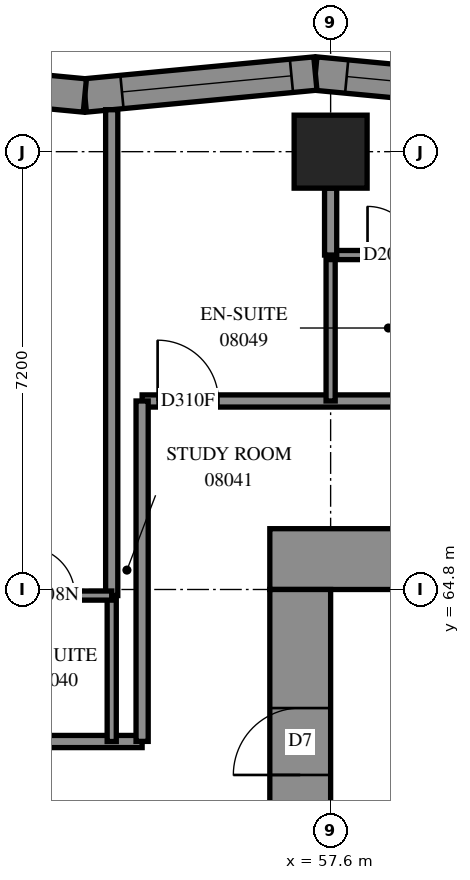
"""IFC4 building model, lengths in metres.
Left out: names, types, materials, properties, quantities, classifications, styles, units other than length and angle.
Written with IfcOpenShell. Run it as: python <this file> out.ifc"""

import sys

from ifc_helpers import new_model, si_unit, direction, frame, frame_2d, origin, origin_2d, place, context, subcontext, project, spatial, polyline, rectangle, outline, extrude, element, fill, save


model = new_model("IFC4")
c1 = context("Model", 3, precision=1e-05, world=origin(), true_north=direction((0.0, 1.0)))
c2 = subcontext(c1, "Body", "Model", "MODEL_VIEW")
j1 = project(units=[si_unit("LENGTHUNIT", "METRE"), si_unit("PLANEANGLEUNIT", "RADIAN")], contexts=[c1])
p1 = place(None, origin())
s1 = spatial("IfcSite", under=j1, at=p1, CompositionType="ELEMENT")
p2 = place(p1, origin())
s2 = spatial("IfcBuilding", under=s1, at=p2, CompositionType="ELEMENT")
p3 = place(p2, frame((0.0, 0.0, 33.8)))
s3 = spatial("IfcBuildingStorey", under=s2, at=p3, CompositionType="ELEMENT", Elevation=33.8)
p4 = place(p3, frame((57.6, 72.0, 0.0), z_axis=(0.0, 0.0, 1.0), x_axis=(1.0, 0.0, 0.0)))
e1 = element("IfcColumn", 1, at=p4, inside=s3, PredefinedType="COLUMN", context=c2, shape_type="SweptSolid", body=[
    extrude(rectangle(XDim=1.2, YDim=1.2, at=origin_2d()), origin(), (0.0, 0.0, 1.0), 3.1),
])
p5 = place(p3, frame((56.6, 65.3, -0.3), z_axis=(0.0, 0.0, 1.0), x_axis=(1.0, 0.0, 0.0)))
e2 = element("IfcWall", 2, at=p5, inside=s3, PredefinedType="SHEAR", context=c2, shape_type="SweptSolid", body=[
    extrude(rectangle(XDim=16.4, YDim=1.0, at=frame_2d((8.2, 0.0))), origin(), (0.0, 0.0, 1.0), 2.7),
])
p6 = place(p5, frame((11.0, 0.0, 0.3)))
e3 = element("IfcOpeningElement", 3, at=p6, cuts=e2, PredefinedType="OPENING", context=c2, shape_type="SweptSolid", body=[
    extrude(rectangle(XDim=0.8, YDim=2.1, at=frame_2d((0.4, 1.05))), frame((0.0, 0.51, 0.0), z_axis=(0.0, -1.0, 0.0), x_axis=(1.0, 0.0, 0.0)), (0.0, 0.0, 1.0), 1.02),
])
p7 = place(p3, frame((57.1, 50.4, -0.3), z_axis=(0.0, 0.0, 1.0), x_axis=(0.0, 1.0, 0.0)))
e4 = element("IfcWall", 4, at=p7, inside=s3, PredefinedType="SHEAR", context=c2, shape_type="SweptSolid", body=[
    extrude(rectangle(XDim=14.4, YDim=1.0, at=frame_2d((7.2, 0.0))), origin(), (0.0, 0.0, 1.0), 2.7),
])
p8 = place(p7, frame((4.55, 0.0, 0.3)))
e5 = element("IfcOpeningElement", 5, at=p8, cuts=e4, PredefinedType="OPENING", context=c2, shape_type="SweptSolid", body=[
    extrude(rectangle(XDim=1.1, YDim=2.1, at=frame_2d((0.55, 1.05))), frame((0.0, 0.51, 0.0), z_axis=(0.0, -1.0, 0.0), x_axis=(1.0, 0.0, 0.0)), (0.0, 0.0, 1.0), 1.02),
])
p9 = place(p7, frame((11.35, 0.0, 0.3)))
e6 = element("IfcOpeningElement", 6, at=p9, cuts=e4, PredefinedType="OPENING", context=c2, shape_type="SweptSolid", body=[
    extrude(rectangle(XDim=1.1, YDim=2.1, at=frame_2d((0.55, 1.05))), frame((0.0, 0.51, 0.0), z_axis=(0.0, -1.0, 0.0), x_axis=(1.0, 0.0, 0.0)), (0.0, 0.0, 1.0), 1.02),
])
p10 = place(p3, frame((61.14, 72.924, 0.0), z_axis=(0.0, 0.0, 1.0), x_axis=(-0.9954966527, 0.0947967005, 0.0)))
e7 = element("IfcWall", 7, at=p10, inside=s3, PredefinedType="SOLIDWALL", context=c2, shape_type="SweptSolid", body=[
    extrude(outline(polyline([(0.026, -0.275), (3.834, -0.275), (3.782, 0.275), (-0.026, 0.275), (0.026, -0.275)])), origin(), (0.0, 0.0, 1.0), 3.1),
])
p11 = place(p10, frame((0.491, 0.0, 0.5)))
e8 = element("IfcOpeningElement", 8, at=p11, cuts=e7, PredefinedType="OPENING", context=c2, shape_type="SweptSolid", body=[
    extrude(rectangle(XDim=2.8, YDim=2.45, at=frame_2d((1.4, 1.225))), frame((0.0, 0.285, 0.0), z_axis=(0.0, -1.0, 0.0), x_axis=(1.0, 0.0, 0.0)), (0.0, 0.0, 1.0), 0.57),
])
p12 = place(p3, frame((57.349, 73.285, 0.0), z_axis=(0.0, 0.0, 1.0), x_axis=(-0.9954966527, -0.0947967005, 0.0)))
e9 = element("IfcWall", 9, at=p12, inside=s3, PredefinedType="SOLIDWALL", context=c2, shape_type="SweptSolid", body=[
    extrude(outline(polyline([(-0.026, -0.275), (3.782, -0.275), (3.834, 0.275), (0.026, 0.275), (-0.026, -0.275)])), origin(), (0.0, 0.0, 1.0), 3.1),
])
p13 = place(p12, frame((0.395, 0.0, 0.5)))
e10 = element("IfcOpeningElement", 10, at=p13, cuts=e9, PredefinedType="OPENING", context=c2, shape_type="SweptSolid", body=[
    extrude(rectangle(XDim=2.8, YDim=2.45, at=frame_2d((1.4, 1.225))), frame((0.0, 0.285, 0.0), z_axis=(0.0, -1.0, 0.0), x_axis=(1.0, 0.0, 0.0)), (0.0, 0.0, 1.0), 0.57),
])
p14 = place(p3, frame((53.558, 72.924, 0.0), z_axis=(0.0, 0.0, 1.0), x_axis=(-0.9954966527, 0.0947967005, 0.0)))
e11 = element("IfcWall", 11, at=p14, inside=s3, PredefinedType="SOLIDWALL", context=c2, shape_type="SweptSolid", body=[
    extrude(outline(polyline([(0.026, -0.275), (3.834, -0.275), (3.782, 0.275), (-0.026, 0.275), (0.026, -0.275)])), origin(), (0.0, 0.0, 1.0), 3.1),
])
p15 = place(p14, frame((1.086, 0.0, 0.5)))
e12 = element("IfcOpeningElement", 12, at=p15, cuts=e11, PredefinedType="OPENING", context=c2, shape_type="SweptSolid", body=[
    extrude(rectangle(XDim=1.2, YDim=2.45, at=frame_2d((0.6, 1.225))), frame((0.0, 0.285, 0.0), z_axis=(0.0, -1.0, 0.0), x_axis=(1.0, 0.0, 0.0)), (0.0, 0.0, 1.0), 0.57),
])
p16 = place(p3, frame((33.502, 62.3, 0.0), z_axis=(0.0, 0.0, 1.0), x_axis=(1.0, 0.0, 0.0)))
e13 = element("IfcWall", 13, at=p16, inside=s3, PredefinedType="PARTITIONING", context=c2, shape_type="SweptSolid", body=[
    extrude(rectangle(XDim=20.998, YDim=0.2, at=frame_2d((10.499, 0.0))), origin(), (0.0, 0.0, 1.0), 3.1),
])
p17 = place(p16, frame((2.898, 0.0, 0.0)))
e14 = element("IfcOpeningElement", 14, at=p17, cuts=e13, PredefinedType="OPENING", context=c2, shape_type="SweptSolid", body=[
    extrude(rectangle(XDim=0.9, YDim=2.1, at=frame_2d((0.45, 1.05))), frame((0.0, 0.11, 0.0), z_axis=(0.0, -1.0, 0.0), x_axis=(1.0, 0.0, 0.0)), (0.0, 0.0, 1.0), 0.22),
])
p18 = place(p16, frame((8.448, 0.0, 0.0)))
e15 = element("IfcOpeningElement", 15, at=p18, cuts=e13, PredefinedType="OPENING", context=c2, shape_type="SweptSolid", body=[
    extrude(rectangle(XDim=0.9, YDim=2.1, at=frame_2d((0.45, 1.05))), frame((0.0, 0.11, 0.0), z_axis=(0.0, -1.0, 0.0), x_axis=(1.0, 0.0, 0.0)), (0.0, 0.0, 1.0), 0.22),
])
p19 = place(p16, frame((10.098, 0.0, 0.0)))
e16 = element("IfcOpeningElement", 16, at=p19, cuts=e13, PredefinedType="OPENING", context=c2, shape_type="SweptSolid", body=[
    extrude(rectangle(XDim=0.9, YDim=2.1, at=frame_2d((0.45, 1.05))), frame((0.0, 0.11, 0.0), z_axis=(0.0, -1.0, 0.0), x_axis=(1.0, 0.0, 0.0)), (0.0, 0.0, 1.0), 0.22),
])
p20 = place(p16, frame((15.648, 0.0, 0.0)))
e17 = element("IfcOpeningElement", 17, at=p20, cuts=e13, PredefinedType="OPENING", context=c2, shape_type="SweptSolid", body=[
    extrude(rectangle(XDim=0.9, YDim=2.1, at=frame_2d((0.45, 1.05))), frame((0.0, 0.11, 0.0), z_axis=(0.0, -1.0, 0.0), x_axis=(1.0, 0.0, 0.0)), (0.0, 0.0, 1.0), 0.22),
])
p21 = place(p16, frame((17.298, 0.0, 0.0)))
e18 = element("IfcOpeningElement", 18, at=p21, cuts=e13, PredefinedType="OPENING", context=c2, shape_type="SweptSolid", body=[
    extrude(rectangle(XDim=0.9, YDim=2.1, at=frame_2d((0.45, 1.05))), frame((0.0, 0.11, 0.0), z_axis=(0.0, -1.0, 0.0), x_axis=(1.0, 0.0, 0.0)), (0.0, 0.0, 1.0), 0.22),
])
p22 = place(p3, frame((54.5, 67.9, 0.0), z_axis=(0.0, 0.0, 1.0), x_axis=(1.0, 0.0, 0.0)))
e19 = element("IfcWall", 19, at=p22, inside=s3, PredefinedType="PARTITIONING", context=c2, shape_type="SweptSolid", body=[
    extrude(rectangle(XDim=20.6, YDim=0.2, at=frame_2d((10.3, 0.0))), origin(), (0.0, 0.0, 1.0), 3.1),
])
p23 = place(p22, frame((0.255, 0.0, 0.0)))
e20 = element("IfcOpeningElement", 20, at=p23, cuts=e19, PredefinedType="OPENING", context=c2, shape_type="SweptSolid", body=[
    extrude(rectangle(XDim=1.0, YDim=2.1, at=frame_2d((0.5, 1.05))), frame((0.0, 0.11, 0.0), z_axis=(0.0, -1.0, 0.0), x_axis=(1.0, 0.0, 0.0)), (0.0, 0.0, 1.0), 0.22),
])
p24 = place(p22, frame((19.345, 0.0, 0.0)))
e21 = element("IfcOpeningElement", 21, at=p24, cuts=e19, PredefinedType="OPENING", context=c2, shape_type="SweptSolid", body=[
    extrude(rectangle(XDim=1.0, YDim=2.1, at=frame_2d((0.5, 1.05))), frame((0.0, 0.11, 0.0), z_axis=(0.0, -1.0, 0.0), x_axis=(1.0, 0.0, 0.0)), (0.0, 0.0, 1.0), 0.22),
])
p25 = place(p22, frame((5.45, 0.0, 0.0)))
e22 = element("IfcOpeningElement", 22, at=p25, cuts=e19, PredefinedType="OPENING", context=c2, shape_type="SweptSolid", body=[
    extrude(rectangle(XDim=0.9, YDim=2.1, at=frame_2d((0.45, 1.05))), frame((0.0, 0.11, 0.0), z_axis=(0.0, -1.0, 0.0), x_axis=(1.0, 0.0, 0.0)), (0.0, 0.0, 1.0), 0.22),
])
p26 = place(p22, frame((7.1, 0.0, 0.0)))
e23 = element("IfcOpeningElement", 23, at=p26, cuts=e19, PredefinedType="OPENING", context=c2, shape_type="SweptSolid", body=[
    extrude(rectangle(XDim=0.9, YDim=2.1, at=frame_2d((0.45, 1.05))), frame((0.0, 0.11, 0.0), z_axis=(0.0, -1.0, 0.0), x_axis=(1.0, 0.0, 0.0)), (0.0, 0.0, 1.0), 0.22),
])
p27 = place(p22, frame((12.65, 0.0, 0.0)))
e24 = element("IfcOpeningElement", 24, at=p27, cuts=e19, PredefinedType="OPENING", context=c2, shape_type="SweptSolid", body=[
    extrude(rectangle(XDim=0.9, YDim=2.1, at=frame_2d((0.45, 1.05))), frame((0.0, 0.11, 0.0), z_axis=(0.0, -1.0, 0.0), x_axis=(1.0, 0.0, 0.0)), (0.0, 0.0, 1.0), 0.22),
])
p28 = place(p22, frame((14.3, 0.0, 0.0)))
e25 = element("IfcOpeningElement", 25, at=p28, cuts=e19, PredefinedType="OPENING", context=c2, shape_type="SweptSolid", body=[
    extrude(rectangle(XDim=0.9, YDim=2.1, at=frame_2d((0.45, 1.05))), frame((0.0, 0.11, 0.0), z_axis=(0.0, -1.0, 0.0), x_axis=(1.0, 0.0, 0.0)), (0.0, 0.0, 1.0), 0.22),
])
p29 = place(p3, frame((54.0, 64.7, 0.0), z_axis=(0.0, 0.0, 1.0), x_axis=(0.0, 1.0, 0.0)))
e26 = element("IfcWall", 26, at=p29, inside=s3, PredefinedType="PARTITIONING", context=c2, shape_type="SweptSolid", body=[
    extrude(rectangle(XDim=7.99, YDim=0.2, at=frame_2d((3.995, 0.0))), origin(), (0.0, 0.0, 1.0), 3.1),
])
p30 = place(p3, frame((54.5, 62.302, 0.0), z_axis=(0.0, 0.0, 1.0), x_axis=(0.0, 1.0, 0.0)))
e27 = element("IfcWall", 27, at=p30, inside=s3, PredefinedType="PARTITIONING", context=c2, shape_type="SweptSolid", body=[
    extrude(rectangle(XDim=5.598, YDim=0.2, at=frame_2d((2.799, 0.0))), origin(), (0.0, 0.0, 1.0), 3.1),
])
for number, where, z_axis, x_axis in (
    (28, (54.0, 62.3, 0.0), (0.0, 0.0, 1.0), (0.0, 1.0, 0.0)),
    (29, (57.6, 67.9, 0.0), (0.0, 0.0, 1.0), (0.0, 1.0, 0.0)),
):
    element("IfcWall", number, at=place(p3, frame(where, z_axis=z_axis, x_axis=x_axis)), inside=s3, PredefinedType="PARTITIONING", context=c2, shape_type="SweptSolid", body=[
        extrude(rectangle(XDim=2.4, YDim=0.15, at=frame_2d((1.2, 0.0))), origin(), (0.0, 0.0, 1.0), 3.1),
    ])
p31 = place(p3, frame((52.1, 64.7, 0.0), z_axis=(0.0, 0.0, 1.0), x_axis=(1.0, 0.0, 0.0)))
e30 = element("IfcWall", 30, at=p31, inside=s3, PredefinedType="PARTITIONING", context=c2, shape_type="SweptSolid", body=[
    extrude(rectangle(XDim=1.9, YDim=0.15, at=frame_2d((0.95, 0.0))), origin(), (0.0, 0.0, 1.0), 3.1),
])
p32 = place(p31, frame((0.493, 0.0, 0.0)))
e31 = element("IfcOpeningElement", 31, at=p32, cuts=e30, PredefinedType="OPENING", context=c2, shape_type="SweptSolid", body=[
    extrude(rectangle(XDim=0.8, YDim=2.1, at=frame_2d((0.4, 1.05))), frame((0.0, 0.085, 0.0), z_axis=(0.0, -1.0, 0.0), x_axis=(1.0, 0.0, 0.0)), (0.0, 0.0, 1.0), 0.17),
])
p33 = place(p3, frame((57.6, 70.3, 0.0), z_axis=(0.0, 0.0, 1.0), x_axis=(1.0, 0.0, 0.0)))
e32 = element("IfcWall", 32, at=p33, inside=s3, PredefinedType="PARTITIONING", context=c2, shape_type="SweptSolid", body=[
    extrude(rectangle(XDim=1.9, YDim=0.15, at=frame_2d((0.95, 0.0))), origin(), (0.0, 0.0, 1.0), 3.1),
])
p34 = place(p33, frame((0.607, 0.0, 0.0)))
e33 = element("IfcOpeningElement", 33, at=p34, cuts=e32, PredefinedType="OPENING", context=c2, shape_type="SweptSolid", body=[
    extrude(rectangle(XDim=0.8, YDim=2.1, at=frame_2d((0.4, 1.05))), frame((0.0, 0.085, 0.0), z_axis=(0.0, -1.0, 0.0), x_axis=(1.0, 0.0, 0.0)), (0.0, 0.0, 1.0), 0.17),
])
p35 = place(p3, frame((57.6, 70.3, 0.0), z_axis=(0.0, 0.0, 1.0), x_axis=(0.0, 1.0, 0.0)))
e34 = element("IfcWall", 34, at=p35, inside=s3, PredefinedType="PARTITIONING", context=c2, shape_type="SweptSolid", body=[
    extrude(rectangle(XDim=1.1, YDim=0.2, at=frame_2d((0.55, 0.0))), origin(), (0.0, 0.0, 1.0), 3.1),
])
p36 = place(p11, origin())
e35 = element("IfcWindow", 35, at=p36, inside=s3, PartitioningType="SINGLE_PANEL", PredefinedType="WINDOW", context=c2, shape_type="SweptSolid", body=[
    extrude(rectangle(XDim=2.8, YDim=2.45, at=frame_2d((1.4, 1.225))), frame((0.0, 0.155, 0.0), z_axis=(0.0, -1.0, 0.0), x_axis=(1.0, 0.0, 0.0)), (0.0, 0.0, 1.0), 0.06),
])
fill(e8, e35)
p37 = place(p13, origin())
e36 = element("IfcWindow", 36, at=p37, inside=s3, PartitioningType="SINGLE_PANEL", PredefinedType="WINDOW", context=c2, shape_type="SweptSolid", body=[
    extrude(rectangle(XDim=2.8, YDim=2.45, at=frame_2d((1.4, 1.225))), frame((0.0, 0.155, 0.0), z_axis=(0.0, -1.0, 0.0), x_axis=(1.0, 0.0, 0.0)), (0.0, 0.0, 1.0), 0.06),
])
fill(e10, e36)
p38 = place(p9, origin())
e37 = element("IfcDoor", 37, at=p38, inside=s3, OperationType="SINGLE_SWING_LEFT", PredefinedType="DOOR", context=c2, shape_type="SweptSolid", body=[
    extrude(rectangle(XDim=1.1, YDim=2.1, at=frame_2d((0.55, 1.05))), frame((0.0, 0.025, 0.0), z_axis=(0.0, -1.0, 0.0), x_axis=(1.0, 0.0, 0.0)), (0.0, 0.0, 1.0), 0.05),
])
fill(e6, e37)
p39 = place(p32, origin())
e38 = element("IfcDoor", 38, at=p39, inside=s3, OperationType="SINGLE_SWING_RIGHT", PredefinedType="DOOR", context=c2, shape_type="SweptSolid", body=[
    extrude(rectangle(XDim=0.8, YDim=2.1, at=frame_2d((0.4, 1.05))), frame((0.0, 0.025, 0.0), z_axis=(0.0, -1.0, 0.0), x_axis=(1.0, 0.0, 0.0)), (0.0, 0.0, 1.0), 0.05),
])
fill(e31, e38)
p40 = place(p23, origin())
e39 = element("IfcDoor", 39, at=p40, inside=s3, OperationType="SINGLE_SWING_LEFT", PredefinedType="DOOR", context=c2, shape_type="SweptSolid", body=[
    extrude(rectangle(XDim=1.0, YDim=2.1, at=frame_2d((0.5, 1.05))), frame((0.0, 0.025, 0.0), z_axis=(0.0, -1.0, 0.0), x_axis=(1.0, 0.0, 0.0)), (0.0, 0.0, 1.0), 0.05),
])
fill(e20, e39)
p41 = place(p34, origin())
e40 = element("IfcDoor", 40, at=p41, inside=s3, OperationType="SINGLE_SWING_RIGHT", PredefinedType="DOOR", context=c2, shape_type="SweptSolid", body=[
    extrude(rectangle(XDim=0.8, YDim=2.1, at=frame_2d((0.4, 1.05))), frame((0.0, 0.025, 0.0), z_axis=(0.0, -1.0, 0.0), x_axis=(1.0, 0.0, 0.0)), (0.0, 0.0, 1.0), 0.05),
])
fill(e33, e40)
save(model, sys.argv[1])
